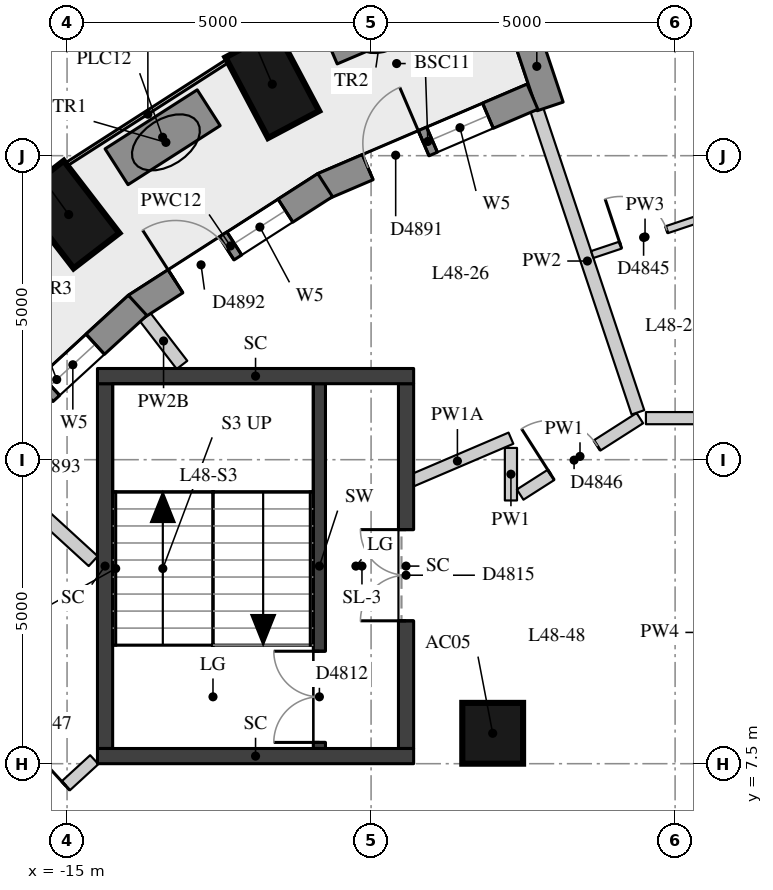
"""IFC4 building model, lengths in metres.
Left out: names, types, materials, properties, quantities, classifications, styles, units other than length and angle.
Written with IfcOpenShell. Run it as: python <this file> out.ifc"""

import sys

from ifc_helpers import new_model, si_unit, direction, frame, frame_2d, origin, origin_2d, place, context, subcontext, project, spatial, rectangle, extrude, element, fill, save


model = new_model("IFC4")
c1 = context("Model", 3, precision=1e-05, world=origin(), true_north=direction((0.0, 1.0)))
c2 = subcontext(c1, "Body", "Model", "MODEL_VIEW")
j1 = project(units=[si_unit("LENGTHUNIT", "METRE"), si_unit("PLANEANGLEUNIT", "RADIAN")], contexts=[c1])
p1 = place(None, origin())
s1 = spatial("IfcSite", under=j1, at=p1, CompositionType="ELEMENT")
p2 = place(p1, origin())
s2 = spatial("IfcBuilding", under=s1, at=p2, CompositionType="ELEMENT")
p3 = place(p2, frame((0.0, 0.0, 171.5)))
s3 = spatial("IfcBuildingStorey", under=s2, at=p3, CompositionType="ELEMENT", Elevation=171.5)
for number, where, z_axis, x_axis in (
    (1, (-11.625, 18.676, 0.0), (0.0, 0.0, 1.0), (-0.468, 0.884, 0.0)),
    (2, (-14.973, 16.532, 0.0), (0.0, 0.0, 1.0), (-0.61, 0.792, 0.0)),
):
    element("IfcColumn", number, at=place(p3, frame(where, z_axis=z_axis, x_axis=x_axis)), inside=s3, PredefinedType="COLUMN", context=c2, shape_type="SweptSolid", body=[
        extrude(rectangle(XDim=1.5, YDim=0.95, at=origin_2d()), origin(), (0.0, 0.0, 1.0), 3.3),
    ])
p4 = place(p3, frame((-8.0, 8.0, 0.0), z_axis=(0.0, 0.0, 1.0), x_axis=(1.0, 0.0, 0.0)))
e3 = element("IfcColumn", 3, at=p4, inside=s3, PredefinedType="COLUMN", context=c2, shape_type="SweptSolid", body=[
    extrude(rectangle(XDim=1.0, YDim=1.0, at=origin_2d()), origin(), (0.0, 0.0, 1.0), 3.3),
])
p5 = place(p3, frame((-7.495, 19.629, 0.0), z_axis=(0.0, 0.0, 1.0), x_axis=(0.316754470825, -0.948507567293, 0.0)))
e4 = element("IfcWall", 4, at=p5, inside=s3, PredefinedType="SOLIDWALL", context=c2, shape_type="SweptSolid", body=[
    extrude(rectangle(XDim=1.39, YDim=0.45, at=frame_2d((0.695, 0.0))), origin(), (0.0, 0.0, 1.0), 3.02),
])
p6 = place(p3, frame((-7.345, 18.47, 0.0), z_axis=(0.0, 0.0, 1.0), x_axis=(-0.919454986573, -0.393195279304, 0.0)))
e5 = element("IfcWall", 5, at=p6, inside=s3, PredefinedType="SOLIDWALL", context=c2, shape_type="SweptSolid", body=[
    extrude(rectangle(XDim=3.745, YDim=0.45, at=frame_2d((1.872, 0.0))), origin(), (0.0, 0.0, 1.0), 3.02),
])
p7 = place(p6, frame((0.797, 0.0, 0.4)))
e6 = element("IfcOpeningElement", 6, at=p7, cuts=e5, PredefinedType="OPENING", context=c2, shape_type="SweptSolid", body=[
    extrude(rectangle(XDim=1.0, YDim=1.75, at=frame_2d((0.5, 0.875))), frame((0.0, 0.235, 0.0), z_axis=(0.0, -1.0, 0.0), x_axis=(1.0, 0.0, 0.0)), (0.0, 0.0, 1.0), 0.47),
])
p8 = place(p6, frame((1.947, 0.0, 0.0)))
e7 = element("IfcOpeningElement", 7, at=p8, cuts=e5, PredefinedType="OPENING", context=c2, shape_type="SweptSolid", body=[
    extrude(rectangle(XDim=1.0, YDim=2.15, at=frame_2d((0.5, 1.075))), frame((0.0, 0.235, 0.0), z_axis=(0.0, -1.0, 0.0), x_axis=(1.0, 0.0, 0.0)), (0.0, 0.0, 1.0), 0.47),
])
p9 = place(p3, frame((-10.755, 17.016, 0.0), z_axis=(0.0, 0.0, 1.0), x_axis=(-0.841405539996, -0.540404216549, 0.0)))
e8 = element("IfcWall", 8, at=p9, inside=s3, PredefinedType="SOLIDWALL", context=c2, shape_type="SweptSolid", body=[
    extrude(rectangle(XDim=3.702, YDim=0.45, at=frame_2d((1.851, 0.0))), origin(), (0.0, 0.0, 1.0), 3.02),
])
p10 = place(p9, frame((0.776, 0.0, 0.4)))
e9 = element("IfcOpeningElement", 9, at=p10, cuts=e8, PredefinedType="OPENING", context=c2, shape_type="SweptSolid", body=[
    extrude(rectangle(XDim=1.0, YDim=1.75, at=frame_2d((0.5, 0.875))), frame((0.0, 0.235, 0.0), z_axis=(0.0, -1.0, 0.0), x_axis=(1.0, 0.0, 0.0)), (0.0, 0.0, 1.0), 0.47),
])
p11 = place(p9, frame((1.926, 0.0, 0.0)))
e10 = element("IfcOpeningElement", 10, at=p11, cuts=e8, PredefinedType="OPENING", context=c2, shape_type="SweptSolid", body=[
    extrude(rectangle(XDim=1.0, YDim=2.15, at=frame_2d((0.5, 1.075))), frame((0.0, 0.235, 0.0), z_axis=(0.0, -1.0, 0.0), x_axis=(1.0, 0.0, 0.0)), (0.0, 0.0, 1.0), 0.47),
])
p12 = place(p3, frame((-13.839, 15.039, 0.0), z_axis=(0.0, 0.0, 1.0), x_axis=(-0.736971705023, -0.675923594791, 0.0)))
e11 = element("IfcWall", 11, at=p12, inside=s3, PredefinedType="SOLIDWALL", context=c2, shape_type="SweptSolid", body=[
    extrude(rectangle(XDim=3.611, YDim=0.45, at=frame_2d((1.806, 0.0))), origin(), (0.0, 0.0, 1.0), 3.02),
])
p13 = place(p12, frame((0.946, 0.0, 0.4)))
e12 = element("IfcOpeningElement", 12, at=p13, cuts=e11, PredefinedType="OPENING", context=c2, shape_type="SweptSolid", body=[
    extrude(rectangle(XDim=1.0, YDim=1.75, at=frame_2d((0.5, 0.875))), frame((0.0, 0.235, 0.0), z_axis=(0.0, -1.0, 0.0), x_axis=(1.0, 0.0, 0.0)), (0.0, 0.0, 1.0), 0.47),
])
p14 = place(p12, frame((2.096, 0.0, 0.0)))
e13 = element("IfcOpeningElement", 13, at=p14, cuts=e11, PredefinedType="OPENING", context=c2, shape_type="SweptSolid", body=[
    extrude(rectangle(XDim=1.0, YDim=2.15, at=frame_2d((0.5, 1.075))), frame((0.0, 0.235, 0.0), z_axis=(0.0, -1.0, 0.0), x_axis=(1.0, 0.0, 0.0)), (0.0, 0.0, 1.0), 0.47),
])
for number, where, z_axis, x_axis in (
    (14, (-9.039, 20.038, 0.0), (0.0, 0.0, 1.0), (-0.92, -0.392, 0.0)),
    (15, (-12.67, 18.289, 0.0), (0.0, 0.0, 1.0), (-0.842, -0.539, 0.0)),
):
    element("IfcWall", number, at=place(p3, frame(where, z_axis=z_axis, x_axis=x_axis)), inside=s3, PredefinedType="USERDEFINED", context=c2, shape_type="SweptSolid", body=[
        extrude(rectangle(XDim=1.8, YDim=0.7, at=frame_2d((0.9, 0.0))), origin(), (0.0, 0.0, 1.0), 0.75),
    ])
p15 = place(p3, frame((-10.85, 7.75, 0.0), z_axis=(0.0, 0.0, 1.0), x_axis=(0.0, 1.0, 0.0)))
e16 = element("IfcWall", 16, at=p15, inside=s3, PredefinedType="SHEAR", context=c2, shape_type="SweptSolid", body=[
    extrude(rectangle(XDim=6.0, YDim=0.2, at=frame_2d((3.0, 0.0))), origin(), (0.0, 0.0, 1.0), 3.02),
])
p16 = place(p15, frame((0.1, 0.0, 0.0)))
e17 = element("IfcOpeningElement", 17, at=p16, cuts=e16, PredefinedType="OPENING", context=c2, shape_type="SweptSolid", body=[
    extrude(rectangle(XDim=1.5, YDim=2.1, at=frame_2d((0.75, 1.05))), frame((0.0, 0.11, 0.0), z_axis=(0.0, -1.0, 0.0), x_axis=(1.0, 0.0, 0.0)), (0.0, 0.0, 1.0), 0.22),
])
p17 = place(p3, frame((-14.375, 7.75, -0.28), z_axis=(0.0, 0.0, 1.0), x_axis=(0.0, 1.0, 0.0)))
e18 = element("IfcWall", 18, at=p17, inside=s3, PredefinedType="SHEAR", context=c2, shape_type="SweptSolid", body=[
    extrude(rectangle(XDim=6.0, YDim=0.25, at=frame_2d((3.0, 0.0))), origin(), (0.0, 0.0, 1.0), 3.3),
])
p18 = place(p3, frame((-9.425, 7.75, -0.28), z_axis=(0.0, 0.0, 1.0), x_axis=(0.0, 1.0, 0.0)))
e19 = element("IfcWall", 19, at=p18, inside=s3, PredefinedType="SHEAR", context=c2, shape_type="SweptSolid", body=[
    extrude(rectangle(XDim=6.0, YDim=0.25, at=frame_2d((3.0, 0.0))), origin(), (0.0, 0.0, 1.0), 3.3),
])
p19 = place(p18, frame((2.1, 0.0, 0.28)))
e20 = element("IfcOpeningElement", 20, at=p19, cuts=e19, PredefinedType="OPENING", context=c2, shape_type="SweptSolid", body=[
    extrude(rectangle(XDim=1.5, YDim=2.1, at=frame_2d((0.75, 1.05))), frame((0.0, 0.135, 0.0), z_axis=(0.0, -1.0, 0.0), x_axis=(1.0, 0.0, 0.0)), (0.0, 0.0, 1.0), 0.27),
])
for number, where, z_axis, x_axis in (
    (21, (-14.5, 13.875, -0.28), (0.0, 0.0, 1.0), (1.0, 0.0, 0.0)),
    (22, (-14.5, 7.625, -0.28), (0.0, 0.0, 1.0), (1.0, 0.0, 0.0)),
):
    element("IfcWall", number, at=place(p3, frame(where, z_axis=z_axis, x_axis=x_axis)), inside=s3, PredefinedType="SHEAR", context=c2, shape_type="SweptSolid", body=[
        extrude(rectangle(XDim=5.2, YDim=0.25, at=frame_2d((2.6, 0.0))), origin(), (0.0, 0.0, 1.0), 3.3),
    ])
p20 = place(p3, frame((-16.154, 6.097, 0.0), z_axis=(0.0, 0.0, 1.0), x_axis=(0.736958194284, 0.675938325498, 0.0)))
e23 = element("IfcWall", 23, at=p20, inside=s3, PredefinedType="PARTITIONING", context=c2, shape_type="SweptSolid", body=[
    extrude(rectangle(XDim=2.173, YDim=0.2, at=frame_2d((1.086, 0.0))), origin(), (0.0, 0.0, 1.0), 3.02),
])
p21 = place(p20, frame((0.636, 0.0, 0.0)))
e24 = element("IfcOpeningElement", 24, at=p21, cuts=e23, PredefinedType="OPENING", context=c2, shape_type="SweptSolid", body=[
    extrude(rectangle(XDim=0.9, YDim=2.1, at=frame_2d((0.45, 1.05))), frame((0.0, 0.11, 0.0), z_axis=(0.0, -1.0, 0.0), x_axis=(1.0, 0.0, 0.0)), (0.0, 0.0, 1.0), 0.22),
])
p22 = place(p3, frame((-9.46, 12.101, 0.0), z_axis=(0.0, 0.0, 1.0), x_axis=(0.919441549003, 0.393226700475, 0.0)))
e25 = element("IfcWall", 25, at=p22, inside=s3, PredefinedType="PARTITIONING", context=c2, shape_type="SweptSolid", body=[
    extrude(rectangle(XDim=1.915, YDim=0.2, at=frame_2d((0.958, 0.0))), origin(), (0.0, 0.0, 1.0), 2.57),
])
p23 = place(p3, frame((-7.7, 12.693, 0.0), z_axis=(0.0, 0.0, 1.0), x_axis=(0.0, -1.0, 0.0)))
e26 = element("IfcWall", 26, at=p23, inside=s3, PredefinedType="PARTITIONING", context=c2, shape_type="SweptSolid", body=[
    extrude(rectangle(XDim=0.864, YDim=0.2, at=frame_2d((0.432, 0.0))), origin(), (0.0, 0.0, 1.0), 3.02),
])
p24 = place(p3, frame((-7.548, 11.926, 0.0), z_axis=(0.0, 0.0, 1.0), x_axis=(0.842760799664, 0.538288244855, 0.0)))
e27 = element("IfcWall", 27, at=p24, inside=s3, PredefinedType="PARTITIONING", context=c2, shape_type="SweptSolid", body=[
    extrude(rectangle(XDim=2.336, YDim=0.2, at=frame_2d((1.168, 0.0))), origin(), (0.0, 0.0, 1.0), 3.02),
])
p25 = place(p24, frame((0.602, 0.0, 0.0)))
e28 = element("IfcOpeningElement", 28, at=p25, cuts=e27, PredefinedType="OPENING", context=c2, shape_type="SweptSolid", body=[
    extrude(rectangle(XDim=0.9, YDim=2.1, at=frame_2d((0.45, 1.05))), frame((0.0, 0.11, 0.0), z_axis=(0.0, -1.0, 0.0), x_axis=(1.0, 0.0, 0.0)), (0.0, 0.0, 1.0), 0.22),
])
p26 = place(p3, frame((-5.48, 13.183, 0.0), z_axis=(0.0, 0.0, 1.0), x_axis=(1.0, 0.0, 0.0)))
e29 = element("IfcWall", 29, at=p26, inside=s3, PredefinedType="PARTITIONING", context=c2, shape_type="SweptSolid", body=[
    extrude(rectangle(XDim=11.26, YDim=0.2, at=frame_2d((5.63, 0.0))), origin(), (0.0, 0.0, 1.0), 3.02),
])
p27 = place(p26, frame((9.368, 0.0, 0.0)))
e30 = element("IfcOpeningElement", 30, at=p27, cuts=e29, PredefinedType="OPENING", context=c2, shape_type="SweptSolid", body=[
    extrude(rectangle(XDim=1.1, YDim=2.1, at=frame_2d((0.55, 1.05))), frame((0.0, 0.11, 0.0), z_axis=(0.0, -1.0, 0.0), x_axis=(1.0, 0.0, 0.0)), (0.0, 0.0, 1.0), 0.22),
])
p28 = place(p26, frame((3.115, 0.0, 0.0)))
e31 = element("IfcOpeningElement", 31, at=p28, cuts=e29, PredefinedType="OPENING", context=c2, shape_type="SweptSolid", body=[
    extrude(rectangle(XDim=1.1, YDim=2.1, at=frame_2d((0.55, 1.05))), frame((0.0, 0.11, 0.0), z_axis=(0.0, -1.0, 0.0), x_axis=(1.0, 0.0, 0.0)), (0.0, 0.0, 1.0), 0.22),
])
p29 = place(p3, frame((-7.274, 18.256, 0.0), z_axis=(0.0, 0.0, 1.0), x_axis=(0.316758050248, -0.948506371936, 0.0)))
e32 = element("IfcWall", 32, at=p29, inside=s3, PredefinedType="PARTITIONING", context=c2, shape_type="SweptSolid", body=[
    extrude(rectangle(XDim=5.248, YDim=0.22, at=frame_2d((2.624, 0.0))), origin(), (0.0, 0.0, 1.0), 3.02),
])
p30 = place(p3, frame((-13.716, 14.846, 0.0), z_axis=(0.0, 0.0, 1.0), x_axis=(0.609971806764, -0.792423116115, 0.0)))
e33 = element("IfcWall", 33, at=p30, inside=s3, PredefinedType="PARTITIONING", context=c2, shape_type="SweptSolid", body=[
    extrude(rectangle(XDim=0.994, YDim=0.22, at=frame_2d((0.497, 0.0))), origin(), (0.0, 0.0, 1.0), 2.57),
])
p31 = place(p3, frame((-16.334, 12.445, 0.0), z_axis=(0.0, 0.0, 1.0), x_axis=(0.737857346278, -0.674956692347, 0.0)))
e34 = element("IfcWall", 34, at=p31, inside=s3, PredefinedType="PARTITIONING", context=c2, shape_type="SweptSolid", body=[
    extrude(rectangle(XDim=2.391, YDim=0.22, at=frame_2d((1.195, 0.0))), origin(), (0.0, 0.0, 1.0), 3.02),
])
p32 = place(p3, frame((-21.239, 7.16, 0.0), z_axis=(0.0, 0.0, 1.0), x_axis=(0.929520145478, -0.368771337215, 0.0)))
e35 = element("IfcWall", 35, at=p32, inside=s3, PredefinedType="PARTITIONING", context=c2, shape_type="SweptSolid", body=[
    extrude(rectangle(XDim=6.544, YDim=0.22, at=frame_2d((3.272, 0.0))), origin(), (0.0, 0.0, 1.0), 3.02),
])
p33 = place(p3, frame((-4.626, 16.454, 0.0), z_axis=(0.0, 0.0, 1.0), x_axis=(-0.9485230882, -0.31670799035, 0.0)))
e36 = element("IfcWall", 36, at=p33, inside=s3, PredefinedType="PARTITIONING", context=c2, shape_type="SweptSolid", body=[
    extrude(rectangle(XDim=1.83, YDim=0.12, at=frame_2d((0.915, 0.0))), origin(), (0.0, 0.0, 1.0), 3.02),
])
p34 = place(p33, frame((0.54, 0.0, 0.0)))
e37 = element("IfcOpeningElement", 37, at=p34, cuts=e36, PredefinedType="OPENING", context=c2, shape_type="SweptSolid", body=[
    extrude(rectangle(XDim=0.8, YDim=2.1, at=frame_2d((0.4, 1.05))), frame((0.0, 0.07, 0.0), z_axis=(0.0, -1.0, 0.0), x_axis=(1.0, 0.0, 0.0)), (0.0, 0.0, 1.0), 0.14),
])
p35 = place(p7, origin())
e38 = element("IfcWindow", 38, at=p35, inside=s3, PartitioningType="SINGLE_PANEL", PredefinedType="WINDOW", context=c2, shape_type="SweptSolid", body=[
    extrude(rectangle(XDim=1.0, YDim=1.75, at=frame_2d((0.5, 0.875))), frame((0.0, 0.035, 0.0), z_axis=(0.0, -1.0, 0.0), x_axis=(1.0, 0.0, 0.0)), (0.0, 0.0, 1.0), 0.06),
])
fill(e6, e38)
p36 = place(p8, frame((1.0, 0.0, 0.0), z_axis=(0.0, 0.0, 1.0), x_axis=(-1.0, 0.0, 0.0)))
e39 = element("IfcDoor", 39, at=p36, inside=s3, OperationType="SINGLE_SWING_RIGHT", PredefinedType="DOOR", context=c2, shape_type="SweptSolid", body=[
    extrude(rectangle(XDim=1.0, YDim=2.15, at=frame_2d((0.5, 1.075))), frame((0.0, 0.075, 0.0), z_axis=(0.0, -1.0, 0.0), x_axis=(1.0, 0.0, 0.0)), (0.0, 0.0, 1.0), 0.05),
])
fill(e7, e39)
p37 = place(p10, origin())
e40 = element("IfcWindow", 40, at=p37, inside=s3, PartitioningType="SINGLE_PANEL", PredefinedType="WINDOW", context=c2, shape_type="SweptSolid", body=[
    extrude(rectangle(XDim=1.0, YDim=1.75, at=frame_2d((0.5, 0.875))), frame((0.0, 0.035, 0.0), z_axis=(0.0, -1.0, 0.0), x_axis=(1.0, 0.0, 0.0)), (0.0, 0.0, 1.0), 0.06),
])
fill(e9, e40)
p38 = place(p11, frame((1.0, 0.0, 0.0), z_axis=(0.0, 0.0, 1.0), x_axis=(-1.0, 0.0, 0.0)))
e41 = element("IfcDoor", 41, at=p38, inside=s3, OperationType="SINGLE_SWING_LEFT", PredefinedType="DOOR", context=c2, shape_type="SweptSolid", body=[
    extrude(rectangle(XDim=1.0, YDim=2.15, at=frame_2d((0.5, 1.075))), frame((0.0, 0.075, 0.0), z_axis=(0.0, -1.0, 0.0), x_axis=(1.0, 0.0, 0.0)), (0.0, 0.0, 1.0), 0.05),
])
fill(e10, e41)
p39 = place(p13, origin())
e42 = element("IfcWindow", 42, at=p39, inside=s3, PartitioningType="SINGLE_PANEL", PredefinedType="WINDOW", context=c2, shape_type="SweptSolid", body=[
    extrude(rectangle(XDim=1.0, YDim=1.75, at=frame_2d((0.5, 0.875))), frame((0.0, 0.035, 0.0), z_axis=(0.0, -1.0, 0.0), x_axis=(1.0, 0.0, 0.0)), (0.0, 0.0, 1.0), 0.06),
])
fill(e12, e42)
p40 = place(p16, origin())
e43 = element("IfcDoor", 43, at=p40, inside=s3, OperationType="DOUBLE_DOOR_SINGLE_SWING", PredefinedType="DOOR", context=c2, shape_type="SweptSolid", body=[
    extrude(rectangle(XDim=1.5, YDim=2.1, at=frame_2d((0.75, 1.05))), frame((0.0, 0.025, 0.0), z_axis=(0.0, -1.0, 0.0), x_axis=(1.0, 0.0, 0.0)), (0.0, 0.0, 1.0), 0.05),
])
fill(e17, e43)
p41 = place(p19, origin())
e44 = element("IfcDoor", 44, at=p41, inside=s3, OperationType="DOUBLE_DOOR_SINGLE_SWING", PredefinedType="DOOR", context=c2, shape_type="SweptSolid", body=[
    extrude(rectangle(XDim=1.5, YDim=2.1, at=frame_2d((0.75, 1.05))), frame((0.0, 0.025, 0.0), z_axis=(0.0, -1.0, 0.0), x_axis=(1.0, 0.0, 0.0)), (0.0, 0.0, 1.0), 0.05),
])
fill(e20, e44)
p42 = place(p34, origin())
e45 = element("IfcDoor", 45, at=p42, inside=s3, OperationType="SINGLE_SWING_LEFT", PredefinedType="DOOR", context=c2, shape_type="SweptSolid", body=[
    extrude(rectangle(XDim=0.8, YDim=2.1, at=frame_2d((0.4, 1.05))), frame((0.0, 0.025, 0.0), z_axis=(0.0, -1.0, 0.0), x_axis=(1.0, 0.0, 0.0)), (0.0, 0.0, 1.0), 0.05),
])
fill(e37, e45)
p43 = place(p25, origin())
e46 = element("IfcDoor", 46, at=p43, inside=s3, OperationType="SINGLE_SWING_LEFT", PredefinedType="DOOR", context=c2, shape_type="SweptSolid", body=[
    extrude(rectangle(XDim=0.9, YDim=2.1, at=frame_2d((0.45, 1.05))), frame((0.0, 0.025, 0.0), z_axis=(0.0, -1.0, 0.0), x_axis=(1.0, 0.0, 0.0)), (0.0, 0.0, 1.0), 0.05),
])
fill(e28, e46)
p44 = place(p21, origin())
e47 = element("IfcDoor", 47, at=p44, inside=s3, OperationType="SINGLE_SWING_RIGHT", PredefinedType="DOOR", context=c2, shape_type="SweptSolid", body=[
    extrude(rectangle(XDim=0.9, YDim=2.1, at=frame_2d((0.45, 1.05))), frame((0.0, 0.025, 0.0), z_axis=(0.0, -1.0, 0.0), x_axis=(1.0, 0.0, 0.0)), (0.0, 0.0, 1.0), 0.05),
])
fill(e24, e47)
save(model, sys.argv[1])
